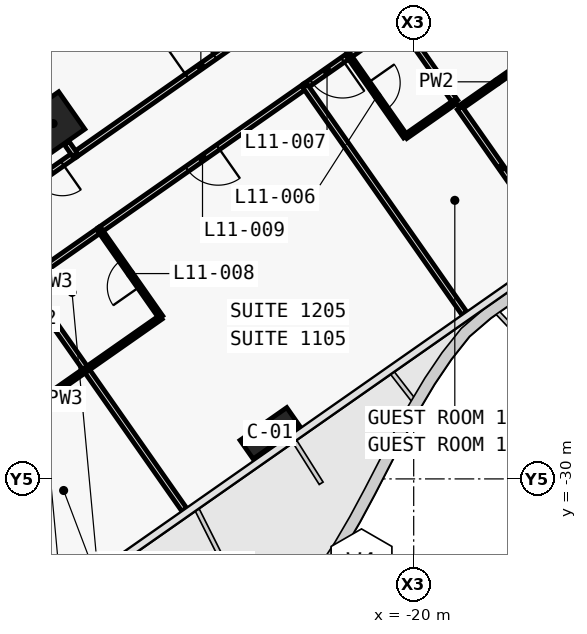
"""IFC4 building model, lengths in metres.
Left out: names, types, materials, properties, quantities, classifications, styles, units other than length and angle.
Written with IfcOpenShell. Run it as: python <this file> out.ifc"""

import sys

from ifc_helpers import new_model, si_unit, direction, frame, frame_2d, origin, origin_2d, place, context, subcontext, project, spatial, rectangle, extrude, element, fill, save


model = new_model("IFC4")
c1 = context("Model", 3, precision=1e-05, world=origin(), true_north=direction((0.0, 1.0)))
c2 = subcontext(c1, "Body", "Model", "MODEL_VIEW")
j1 = project(units=[si_unit("LENGTHUNIT", "METRE"), si_unit("PLANEANGLEUNIT", "RADIAN")], contexts=[c1])
p1 = place(None, origin())
s1 = spatial("IfcSite", under=j1, at=p1, CompositionType="ELEMENT")
p2 = place(p1, origin())
s2 = spatial("IfcBuilding", under=s1, at=p2, CompositionType="ELEMENT")
p3 = place(p2, frame((0.0, 0.0, 65.3)))
s3 = spatial("IfcBuildingStorey", under=s2, at=p3, CompositionType="ELEMENT", Elevation=65.3)
p4 = place(p3, frame((-23.782, -28.799, 0.0), z_axis=(0.0, 0.0, 1.0), x_axis=(-0.819152044289, -0.573576436351, 0.0)))
e1 = element("IfcColumn", 1, at=p4, inside=s3, PredefinedType="COLUMN", context=c2, shape_type="SweptSolid", body=[
    extrude(rectangle(XDim=1.5, YDim=0.6, at=origin_2d()), origin(), (0.0, 0.0, 1.0), 3.6),
])
p5 = place(p3, frame((-29.49, -20.649, 0.0), z_axis=(0.0, 0.0, 1.0), x_axis=(-0.819152044289, -0.573576436351, 0.0)))
e2 = element("IfcColumn", 2, at=p5, inside=s3, PredefinedType="COLUMN", context=c2, shape_type="SweptSolid", body=[
    extrude(rectangle(XDim=1.2, YDim=1.2, at=origin_2d()), origin(), (0.0, 0.0, 1.0), 3.6),
])
p6 = place(p3, frame((-28.917, -21.469, 0.0), z_axis=(0.0, 0.0, 1.0), x_axis=(0.819152599934, 0.573575642807, 0.0)))
e3 = element("IfcWall", 3, at=p6, inside=s3, PredefinedType="PARTITIONING", context=c2, shape_type="SweptSolid", body=[
    extrude(rectangle(XDim=8.098, YDim=0.15, at=frame_2d((4.049, 0.0))), origin(), (0.0, 0.0, 1.0), 2.6),
])
p7 = place(p6, frame((3.599, 0.0, 0.0)))
e4 = element("IfcOpeningElement", 4, at=p7, cuts=e3, PredefinedType="OPENING", context=c2, shape_type="SweptSolid", body=[
    extrude(rectangle(XDim=0.9, YDim=2.1, at=frame_2d((0.45, 1.05))), frame((0.0, 0.085, 0.0), z_axis=(0.0, -1.0, 0.0), x_axis=(1.0, 0.0, 0.0)), (0.0, 0.0, 1.0), 0.17),
])
p8 = place(p3, frame((-28.914, -21.467, 0.0), z_axis=(0.0, 0.0, 1.0), x_axis=(-0.81914197737, -0.573590813132, 0.0)))
e5 = element("IfcWall", 5, at=p8, inside=s3, PredefinedType="PARTITIONING", context=c2, shape_type="SweptSolid", body=[
    extrude(rectangle(XDim=1.403, YDim=0.15, at=frame_2d((0.701, 0.0))), origin(), (0.0, 0.0, 1.0), 2.6),
])
p9 = place(p8, frame((0.403, 0.0, 0.0)))
e6 = element("IfcOpeningElement", 6, at=p9, cuts=e5, PredefinedType="OPENING", context=c2, shape_type="SweptSolid", body=[
    extrude(rectangle(XDim=0.85, YDim=2.1, at=frame_2d((0.425, 1.05))), frame((0.0, 0.085, 0.0), z_axis=(0.0, -1.0, 0.0), x_axis=(1.0, 0.0, 0.0)), (0.0, 0.0, 1.0), 0.17),
])
p10 = place(p3, frame((-21.706, -18.861, 0.0), z_axis=(0.0, 0.0, 1.0), x_axis=(-0.819060210533, -0.573707566205, 0.0)))
e7 = element("IfcWall", 7, at=p10, inside=s3, PredefinedType="PARTITIONING", context=c2, shape_type="SweptSolid", body=[
    extrude(rectangle(XDim=1.403, YDim=0.15, at=frame_2d((0.702, 0.0))), origin(), (0.0, 0.0, 1.0), 3.32),
])
p11 = place(p10, frame((0.201, 0.0, 0.0)))
e8 = element("IfcOpeningElement", 8, at=p11, cuts=e7, PredefinedType="OPENING", context=c2, shape_type="SweptSolid", body=[
    extrude(rectangle(XDim=1.0, YDim=2.1, at=frame_2d((0.5, 1.05))), frame((0.0, 0.085, 0.0), z_axis=(0.0, -1.0, 0.0), x_axis=(1.0, 0.0, 0.0)), (0.0, 0.0, 1.0), 0.17),
])
p12 = place(p3, frame((-20.395, -17.943, 0.0), z_axis=(0.0, 0.0, 1.0), x_axis=(-0.819189013667, -0.573523634986, 0.0)))
e9 = element("IfcWall", 9, at=p12, inside=s3, PredefinedType="PARTITIONING", context=c2, shape_type="SweptSolid", body=[
    extrude(rectangle(XDim=1.604, YDim=0.15, at=frame_2d((0.802, 0.0))), origin(), (0.0, 0.0, 1.0), 2.6),
])
p13 = place(p3, frame((-22.852, -19.664, 0.0), z_axis=(0.0, 0.0, 1.0), x_axis=(-0.819141582452, -0.573591377113, 0.0)))
e10 = element("IfcWall", 10, at=p13, inside=s3, PredefinedType="PARTITIONING", context=c2, shape_type="SweptSolid", body=[
    extrude(rectangle(XDim=6.603, YDim=0.15, at=frame_2d((3.301, 0.0))), origin(), (0.0, 0.0, 1.0), 2.6),
])
p14 = place(p13, frame((2.802, 0.0, 0.0)))
e11 = element("IfcOpeningElement", 11, at=p14, cuts=e10, PredefinedType="OPENING", context=c2, shape_type="SweptSolid", body=[
    extrude(rectangle(XDim=1.0, YDim=2.1, at=frame_2d((0.5, 1.05))), frame((0.0, 0.085, 0.0), z_axis=(0.0, -1.0, 0.0), x_axis=(1.0, 0.0, 0.0)), (0.0, 0.0, 1.0), 0.17),
])
p15 = place(p3, frame((-28.259, -23.449, 0.0), z_axis=(0.0, 0.0, 1.0), x_axis=(-0.819146032251, -0.573585022335, 0.0)))
e12 = element("IfcWall", 12, at=p15, inside=s3, PredefinedType="PARTITIONING", context=c2, shape_type="SweptSolid", body=[
    extrude(rectangle(XDim=2.404, YDim=0.15, at=frame_2d((1.202, 0.0))), origin(), (0.0, 0.0, 1.0), 3.32),
])
p16 = place(p3, frame((-28.916, -21.468, 0.0), z_axis=(0.0, 0.0, 1.0), x_axis=(-0.572944929411, 0.819593867633, 0.0)))
e13 = element("IfcWall", 13, at=p16, inside=s3, PredefinedType="PARTITIONING", context=c2, shape_type="SweptSolid", body=[
    extrude(rectangle(XDim=0.38, YDim=0.15, at=frame_2d((0.19, 0.0))), origin(), (0.0, 0.0, 1.0), 2.6),
])
p17 = place(p3, frame((-18.79, -20.239, 0.0), z_axis=(0.0, 0.0, 1.0), x_axis=(0.819141114317, 0.573592045652, 0.0)))
e14 = element("IfcWall", 14, at=p17, inside=s3, PredefinedType="PARTITIONING", context=c2, shape_type="SweptSolid", body=[
    extrude(rectangle(XDim=2.4, YDim=0.12, at=frame_2d((1.2, 0.0))), origin(), (0.0, 0.0, 1.0), 2.6),
])
p18 = place(p3, frame((-16.823, -18.861, 0.0), z_axis=(0.0, 0.0, 1.0), x_axis=(-0.573608623498, 0.819129505664, 0.0)))
e15 = element("IfcWall", 15, at=p18, inside=s3, PredefinedType="PARTITIONING", context=c2, shape_type="SweptSolid", body=[
    extrude(rectangle(XDim=2.8, YDim=0.12, at=frame_2d((1.4, 0.0))), origin(), (0.0, 0.0, 1.0), 3.32),
])
p19 = place(p18, frame((0.975, 0.0, 0.0)))
e16 = element("IfcOpeningElement", 16, at=p19, cuts=e15, PredefinedType="OPENING", context=c2, shape_type="SweptSolid", body=[
    extrude(rectangle(XDim=0.85, YDim=2.05, at=frame_2d((0.425, 1.025))), frame((0.0, 0.07, 0.0), z_axis=(0.0, -1.0, 0.0), x_axis=(1.0, 0.0, 0.0)), (0.0, 0.0, 1.0), 0.14),
])
p20 = place(p3, frame((-16.594, -23.375, 0.0), z_axis=(0.0, 0.0, 1.0), x_axis=(-0.573594994199, 0.819139049631, 0.0)))
e17 = element("IfcWall", 17, at=p20, inside=s3, PredefinedType="PARTITIONING", context=c2, shape_type="SweptSolid", body=[
    extrude(rectangle(XDim=3.829, YDim=0.15, at=frame_2d((1.915, 0.0))), origin(), (0.0, 0.0, 1.0), 2.6),
])
p21 = place(p3, frame((-18.904, -20.075, 0.0), z_axis=(0.0, 0.0, 1.0), x_axis=(-0.573651240222, 0.819099660964, 0.0)))
e18 = element("IfcWall", 18, at=p21, inside=s3, PredefinedType="PARTITIONING", context=c2, shape_type="SweptSolid", body=[
    extrude(rectangle(XDim=2.602, YDim=0.15, at=frame_2d((1.301, 0.0))), origin(), (0.0, 0.0, 1.0), 2.6),
])
p22 = place(p3, frame((-21.708, -18.862, 0.0), z_axis=(0.0, 0.0, 1.0), x_axis=(0.573537965655, -0.819178980414, 0.0)))
e19 = element("IfcWall", 19, at=p22, inside=s3, PredefinedType="PARTITIONING", context=c2, shape_type="SweptSolid", body=[
    extrude(rectangle(XDim=2.6, YDim=0.12, at=frame_2d((1.3, 0.0))), origin(), (0.0, 0.0, 1.0), 3.32),
])
p23 = place(p22, frame((0.875, 0.0, 0.0)))
e20 = element("IfcOpeningElement", 20, at=p23, cuts=e19, PredefinedType="OPENING", context=c2, shape_type="SweptSolid", body=[
    extrude(rectangle(XDim=0.85, YDim=2.05, at=frame_2d((0.425, 1.025))), frame((0.0, 0.07, 0.0), z_axis=(0.0, -1.0, 0.0), x_axis=(1.0, 0.0, 0.0)), (0.0, 0.0, 1.0), 0.14),
])
p24 = place(p3, frame((-20.215, -20.992, 0.0), z_axis=(0.0, 0.0, 1.0), x_axis=(0.819131543282, 0.57360571371, 0.0)))
e21 = element("IfcWall", 21, at=p24, inside=s3, PredefinedType="PARTITIONING", context=c2, shape_type="SweptSolid", body=[
    extrude(rectangle(XDim=1.6, YDim=0.12, at=frame_2d((0.8, 0.0))), origin(), (0.0, 0.0, 1.0), 2.6),
])
p25 = place(p3, frame((-18.667, -25.645, 0.0), z_axis=(0.0, 0.0, 1.0), x_axis=(-0.573572324301, 0.819154923562, 0.0)))
e22 = element("IfcWall", 22, at=p25, inside=s3, PredefinedType="PARTITIONING", context=c2, shape_type="SweptSolid", body=[
    extrude(rectangle(XDim=7.3, YDim=0.15, at=frame_2d((3.65, 0.0))), origin(), (0.0, 0.0, 1.0), 2.5),
])
p26 = place(p3, frame((-28.62, -27.121, 0.0), z_axis=(0.0, 0.0, 1.0), x_axis=(0.819188907105, 0.573523787192, 0.0)))
e23 = element("IfcWall", 23, at=p26, inside=s3, PredefinedType="PARTITIONING", context=c2, shape_type="SweptSolid", body=[
    extrude(rectangle(XDim=2.4, YDim=0.12, at=frame_2d((1.2, 0.0))), origin(), (0.0, 0.0, 1.0), 3.32),
])
p27 = place(p3, frame((-26.653, -25.743, 0.0), z_axis=(0.0, 0.0, 1.0), x_axis=(-0.573608623498, 0.819129505664, 0.0)))
e24 = element("IfcWall", 24, at=p27, inside=s3, PredefinedType="PARTITIONING", context=c2, shape_type="SweptSolid", body=[
    extrude(rectangle(XDim=2.8, YDim=0.12, at=frame_2d((1.4, 0.0))), origin(), (0.0, 0.0, 1.0), 3.32),
])
p28 = place(p27, frame((0.975, 0.0, 0.0)))
e25 = element("IfcOpeningElement", 25, at=p28, cuts=e24, PredefinedType="OPENING", context=c2, shape_type="SweptSolid", body=[
    extrude(rectangle(XDim=0.85, YDim=2.05, at=frame_2d((0.425, 1.025))), frame((0.0, 0.07, 0.0), z_axis=(0.0, -1.0, 0.0), x_axis=(1.0, 0.0, 0.0)), (0.0, 0.0, 1.0), 0.14),
])
p29 = place(p3, frame((-26.039, -30.807, 0.0), z_axis=(0.0, 0.0, 1.0), x_axis=(-0.573589807488, 0.819142681555, 0.0)))
e26 = element("IfcWall", 26, at=p29, inside=s3, PredefinedType="PARTITIONING", context=c2, shape_type="SweptSolid", body=[
    extrude(rectangle(XDim=4.499, YDim=0.15, at=frame_2d((2.25, 0.0))), origin(), (0.0, 0.0, 1.0), 2.5),
])
p30 = place(p3, frame((-28.62, -27.121, 0.0), z_axis=(0.0, 0.0, 1.0), x_axis=(-0.573608623498, 0.819129505664, 0.0)))
e27 = element("IfcWall", 27, at=p30, inside=s3, PredefinedType="PARTITIONING", context=c2, shape_type="SweptSolid", body=[
    extrude(rectangle(XDim=2.8, YDim=0.15, at=frame_2d((1.4, 0.0))), origin(), (0.0, 0.0, 1.0), 3.32),
])
p31 = place(p3, frame((-30.586, -28.498, 0.0), z_axis=(0.0, 0.0, 1.0), x_axis=(0.819141114317, 0.573592045652, 0.0)))
e28 = element("IfcWall", 28, at=p31, inside=s3, PredefinedType="PARTITIONING", context=c2, shape_type="SweptSolid", body=[
    extrude(rectangle(XDim=2.4, YDim=0.12, at=frame_2d((1.2, 0.0))), origin(), (0.0, 0.0, 1.0), 3.32),
])
p32 = place(p23, origin())
e29 = element("IfcDoor", 29, at=p32, inside=s3, OperationType="SINGLE_SWING_LEFT", PredefinedType="DOOR", context=c2, shape_type="SweptSolid", body=[
    extrude(rectangle(XDim=0.85, YDim=2.05, at=frame_2d((0.425, 1.025))), frame((0.0, 0.025, 0.0), z_axis=(0.0, -1.0, 0.0), x_axis=(1.0, 0.0, 0.0)), (0.0, 0.0, 1.0), 0.05),
])
fill(e20, e29)
p33 = place(p11, origin())
e30 = element("IfcDoor", 30, at=p33, inside=s3, OperationType="SINGLE_SWING_RIGHT", PredefinedType="DOOR", context=c2, shape_type="SweptSolid", body=[
    extrude(rectangle(XDim=1.0, YDim=2.1, at=frame_2d((0.5, 1.05))), frame((0.0, 0.025, 0.0), z_axis=(0.0, -1.0, 0.0), x_axis=(1.0, 0.0, 0.0)), (0.0, 0.0, 1.0), 0.05),
])
fill(e8, e30)
p34 = place(p28, origin())
e31 = element("IfcDoor", 31, at=p34, inside=s3, OperationType="SINGLE_SWING_RIGHT", PredefinedType="DOOR", context=c2, shape_type="SweptSolid", body=[
    extrude(rectangle(XDim=0.85, YDim=2.05, at=frame_2d((0.425, 1.025))), frame((0.0, 0.025, 0.0), z_axis=(0.0, -1.0, 0.0), x_axis=(1.0, 0.0, 0.0)), (0.0, 0.0, 1.0), 0.05),
])
fill(e25, e31)
p35 = place(p14, origin())
e32 = element("IfcDoor", 32, at=p35, inside=s3, OperationType="SINGLE_SWING_RIGHT", PredefinedType="DOOR", context=c2, shape_type="SweptSolid", body=[
    extrude(rectangle(XDim=1.0, YDim=2.1, at=frame_2d((0.5, 1.05))), frame((0.0, 0.025, 0.0), z_axis=(0.0, -1.0, 0.0), x_axis=(1.0, 0.0, 0.0)), (0.0, 0.0, 1.0), 0.05),
])
fill(e11, e32)
p36 = place(p7, origin())
e33 = element("IfcDoor", 33, at=p36, inside=s3, OperationType="SINGLE_SWING_LEFT", PredefinedType="DOOR", context=c2, shape_type="SweptSolid", body=[
    extrude(rectangle(XDim=0.9, YDim=2.1, at=frame_2d((0.45, 1.05))), frame((0.0, 0.025, 0.0), z_axis=(0.0, -1.0, 0.0), x_axis=(1.0, 0.0, 0.0)), (0.0, 0.0, 1.0), 0.05),
])
fill(e4, e33)
p37 = place(p9, origin())
e34 = element("IfcDoor", 34, at=p37, inside=s3, OperationType="SINGLE_SWING_LEFT", PredefinedType="DOOR", context=c2, shape_type="SweptSolid", body=[
    extrude(rectangle(XDim=0.85, YDim=2.1, at=frame_2d((0.425, 1.05))), frame((0.0, 0.025, 0.0), z_axis=(0.0, -1.0, 0.0), x_axis=(1.0, 0.0, 0.0)), (0.0, 0.0, 1.0), 0.05),
])
fill(e6, e34)
save(model, sys.argv[1])
